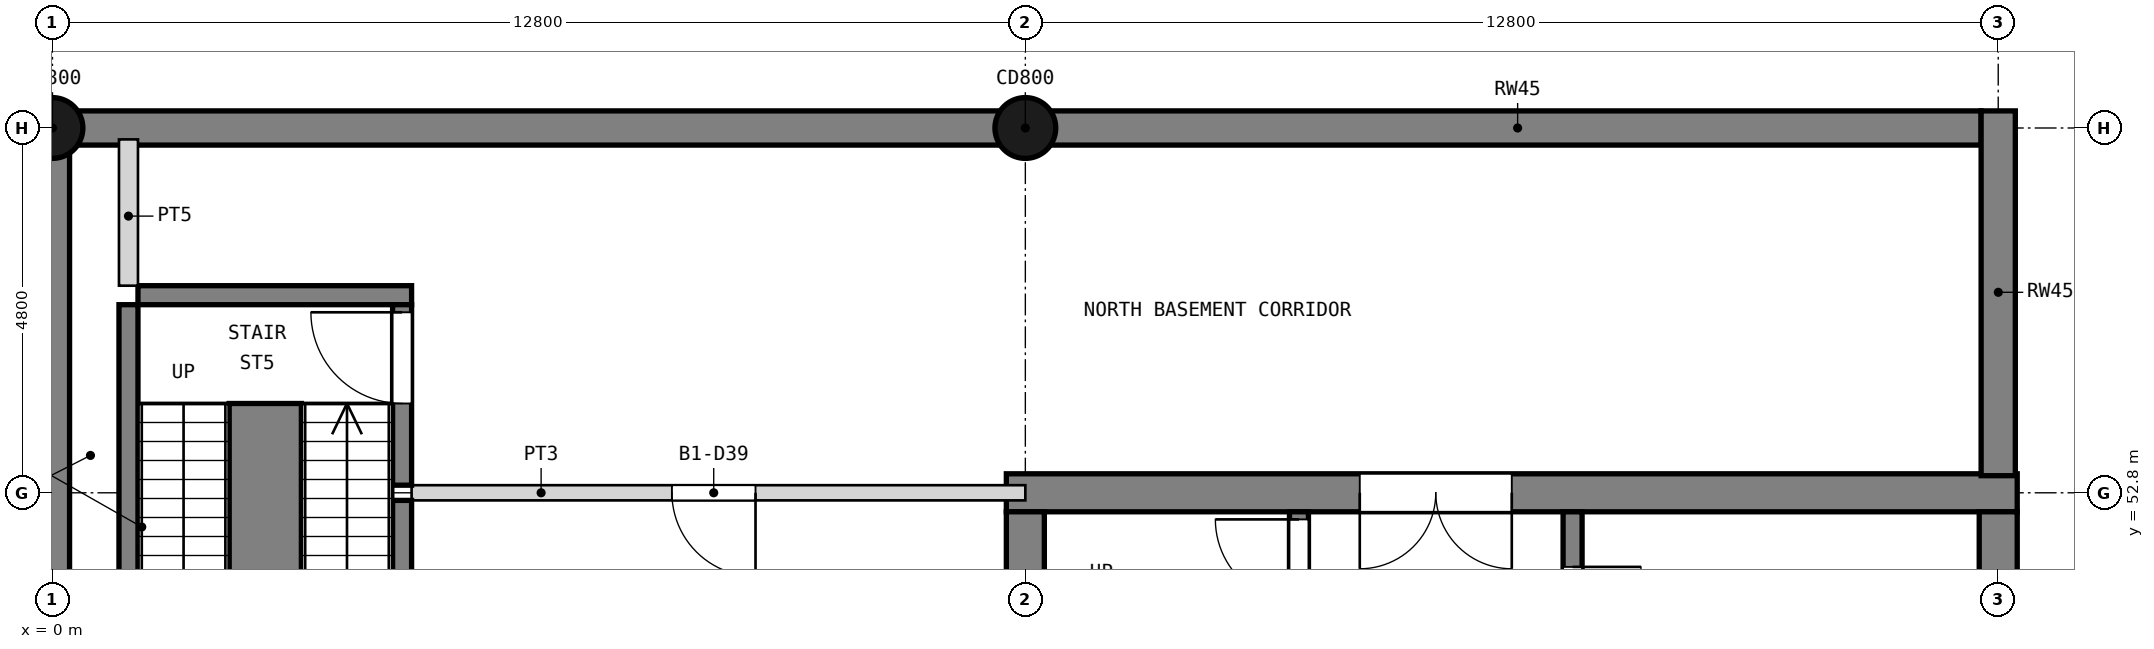
"""IFC4 building model, lengths in metres.
Left out: names, types, materials, properties, quantities, classifications, styles, units other than length and angle.
Written with IfcOpenShell. Run it as: python <this file> out.ifc"""

import sys

from ifc_helpers import new_model, si_unit, direction, frame, frame_2d, origin, origin_2d, place, context, subcontext, project, spatial, rectangle, circle, extrude, element, fill, save


model = new_model("IFC4")
c1 = context("Model", 3, precision=1e-05, world=origin(), true_north=direction((0.0, 1.0)))
c2 = subcontext(c1, "Body", "Model", "MODEL_VIEW")
j1 = project(units=[si_unit("LENGTHUNIT", "METRE"), si_unit("PLANEANGLEUNIT", "RADIAN")], contexts=[c1])
p1 = place(None, origin())
s1 = spatial("IfcSite", under=j1, at=p1, CompositionType="ELEMENT")
p2 = place(p1, origin())
s2 = spatial("IfcBuilding", under=s1, at=p2, CompositionType="ELEMENT")
p3 = place(p2, frame((0.0, 0.0, -4.8)))
s3 = spatial("IfcBuildingStorey", under=s2, at=p3, CompositionType="ELEMENT", Elevation=-4.8)
p4 = place(p3, frame((12.55, 52.8, 0.0), z_axis=(0.0, 0.0, 1.0), x_axis=(1.0, 0.0, 0.0)))
e1 = element("IfcWall", 1, at=p4, inside=s3, PredefinedType="SHEAR", context=c2, shape_type="SweptSolid", body=[
    extrude(rectangle(XDim=13.3, YDim=0.5, at=frame_2d((6.65, 0.0))), origin(), (0.0, 0.0, 1.0), 4.8),
])
p5 = place(p4, frame((4.65, 0.0, 0.0)))
e2 = element("IfcOpeningElement", 2, at=p5, cuts=e1, PredefinedType="OPENING", context=c2, shape_type="SweptSolid", body=[
    extrude(rectangle(XDim=2.0, YDim=2.1, at=frame_2d((1.0, 1.05))), frame((0.0, 0.26, 0.0), z_axis=(0.0, -1.0, 0.0), x_axis=(1.0, 0.0, 0.0)), (0.0, 0.0, 1.0), 0.52),
])
for number, where, z_axis, x_axis in (
    (3, (25.6, 33.85, 0.0), (0.0, 0.0, 1.0), (0.0, 1.0, 0.0)),
    (4, (12.8, 33.85, 0.0), (0.0, 0.0, 1.0), (0.0, 1.0, 0.0)),
):
    element("IfcWall", number, at=place(p3, frame(where, z_axis=z_axis, x_axis=x_axis)), inside=s3, PredefinedType="SHEAR", context=c2, shape_type="SweptSolid", body=[
        extrude(rectangle(XDim=18.7, YDim=0.5, at=frame_2d((9.35, 0.0))), origin(), (0.0, 0.0, 1.0), 4.8),
    ])
p6 = place(p3, frame((0.0, -0.225, 0.0), z_axis=(0.0, 0.0, 1.0), x_axis=(0.0, 1.0, 0.0)))
e5 = element("IfcWall", 5, at=p6, inside=s3, PredefinedType="SOLIDWALL", context=c2, shape_type="SweptSolid", body=[
    extrude(rectangle(XDim=58.05, YDim=0.45, at=frame_2d((29.025, 0.0))), origin(), (0.0, 0.0, 1.0), 4.8),
])
p7 = place(p3, frame((0.225, 57.6, 0.0), z_axis=(0.0, 0.0, 1.0), x_axis=(1.0, 0.0, 0.0)))
e6 = element("IfcWall", 6, at=p7, inside=s3, PredefinedType="SOLIDWALL", context=c2, shape_type="SweptSolid", body=[
    extrude(rectangle(XDim=25.15, YDim=0.45, at=frame_2d((12.575, 0.0))), origin(), (0.0, 0.0, 1.0), 4.8),
])
p8 = place(p3, frame((25.6, 53.025, 0.0), z_axis=(0.0, 0.0, 1.0), x_axis=(0.0, 1.0, 0.0)))
e7 = element("IfcWall", 7, at=p8, inside=s3, PredefinedType="SOLIDWALL", context=c2, shape_type="SweptSolid", body=[
    extrude(rectangle(XDim=4.8, YDim=0.45, at=frame_2d((2.4, 0.0))), origin(), (0.0, 0.0, 1.0), 4.8),
])
for number, where, z_axis, x_axis in (
    (8, (0.0, 57.6, 0.0), (0.0, 0.0, 1.0), (1.0, 0.0, 0.0)),
    (9, (12.8, 57.6, 0.0), (0.0, 0.0, 1.0), (1.0, 0.0, 0.0)),
):
    element("IfcColumn", number, at=place(p3, frame(where, z_axis=z_axis, x_axis=x_axis)), inside=s3, PredefinedType="COLUMN", context=c2, shape_type="SweptSolid", body=[
        extrude(circle(Radius=0.4, at=origin_2d()), origin(), (0.0, 0.0, 1.0), 4.8),
    ])
p9 = place(p3, frame((16.4, 46.475, 0.0), z_axis=(0.0, 0.0, 1.0), x_axis=(0.0, 1.0, 0.0)))
e10 = element("IfcWall", 10, at=p9, inside=s3, PredefinedType="SOLIDWALL", context=c2, shape_type="SweptSolid", body=[
    extrude(rectangle(XDim=6.075, YDim=0.25, at=frame_2d((3.038, 0.0))), origin(), (0.0, 0.0, 1.0), 4.5),
])
p10 = place(p9, frame((4.875, 0.0, 0.0)))
e11 = element("IfcOpeningElement", 11, at=p10, cuts=e10, PredefinedType="OPENING", context=c2, shape_type="SweptSolid", body=[
    extrude(rectangle(XDim=1.1, YDim=2.1, at=frame_2d((0.55, 1.05))), frame((0.0, 0.135, 0.0), z_axis=(0.0, -1.0, 0.0), x_axis=(1.0, 0.0, 0.0)), (0.0, 0.0, 1.0), 0.27),
])
p11 = place(p3, frame((20.0, 46.475, 0.0), z_axis=(0.0, 0.0, 1.0), x_axis=(0.0, 1.0, 0.0)))
e12 = element("IfcWall", 12, at=p11, inside=s3, PredefinedType="SOLIDWALL", context=c2, shape_type="SweptSolid", body=[
    extrude(rectangle(XDim=6.075, YDim=0.25, at=frame_2d((3.038, 0.0))), origin(), (0.0, 0.0, 1.0), 4.5),
])
p12 = place(p11, frame((1.312, 0.0, 0.0)))
e13 = element("IfcOpeningElement", 13, at=p12, cuts=e12, PredefinedType="OPENING", context=c2, shape_type="SweptSolid", body=[
    extrude(rectangle(XDim=1.0, YDim=2.1, at=frame_2d((0.5, 1.05))), frame((0.0, 0.135, 0.0), z_axis=(0.0, -1.0, 0.0), x_axis=(1.0, 0.0, 0.0)), (0.0, 0.0, 1.0), 0.27),
])
p13 = place(p11, frame((4.45, 0.0, 0.0)))
e14 = element("IfcOpeningElement", 14, at=p13, cuts=e12, PredefinedType="OPENING", context=c2, shape_type="SweptSolid", body=[
    extrude(rectangle(XDim=0.9, YDim=2.1, at=frame_2d((0.45, 1.05))), frame((0.0, 0.135, 0.0), z_axis=(0.0, -1.0, 0.0), x_axis=(1.0, 0.0, 0.0)), (0.0, 0.0, 1.0), 0.27),
])
p14 = place(p3, frame((4.725, 52.8, 0.0), z_axis=(0.0, 0.0, 1.0), x_axis=(1.0, 0.0, 0.0)))
e15 = element("IfcWall", 15, at=p14, inside=s3, PredefinedType="PARTITIONING", context=c2, shape_type="SweptSolid", body=[
    extrude(rectangle(XDim=8.075, YDim=0.2, at=frame_2d((4.038, 0.0))), origin(), (0.0, 0.0, 1.0), 4.5),
])
p15 = place(p14, frame((3.425, 0.0, 0.0)))
e16 = element("IfcOpeningElement", 16, at=p15, cuts=e15, PredefinedType="OPENING", context=c2, shape_type="SweptSolid", body=[
    extrude(rectangle(XDim=1.1, YDim=2.1, at=frame_2d((0.55, 1.05))), frame((0.0, 0.11, 0.0), z_axis=(0.0, -1.0, 0.0), x_axis=(1.0, 0.0, 0.0)), (0.0, 0.0, 1.0), 0.22),
])
p16 = place(p3, frame((1.125, 55.4, 0.0), z_axis=(0.0, 0.0, 1.0), x_axis=(1.0, 0.0, 0.0)))
e17 = element("IfcWall", 17, at=p16, inside=s3, PredefinedType="SHEAR", context=c2, shape_type="SweptSolid", body=[
    extrude(rectangle(XDim=3.6, YDim=0.25, at=frame_2d((1.8, 0.0))), origin(), (0.0, 0.0, 1.0), 4.5),
])
p17 = place(p3, frame((1.0, 49.525, 0.0), z_axis=(0.0, 0.0, 1.0), x_axis=(0.0, 1.0, 0.0)))
e18 = element("IfcWall", 18, at=p17, inside=s3, PredefinedType="SHEAR", context=c2, shape_type="SweptSolid", body=[
    extrude(rectangle(XDim=5.75, YDim=0.25, at=frame_2d((2.875, 0.0))), origin(), (0.0, 0.0, 1.0), 4.5),
])
p18 = place(p3, frame((1.0, 55.525, 0.0), z_axis=(0.0, 0.0, 1.0), x_axis=(0.0, 1.0, 0.0)))
e19 = element("IfcWall", 19, at=p18, inside=s3, PredefinedType="PARTITIONING", context=c2, shape_type="SweptSolid", body=[
    extrude(rectangle(XDim=1.925, YDim=0.25, at=frame_2d((0.962, 0.0))), origin(), (0.0, 0.0, 1.0), 4.5),
])
p19 = place(p3, frame((4.6, 49.525, 0.0), z_axis=(0.0, 0.0, 1.0), x_axis=(0.0, 1.0, 0.0)))
e20 = element("IfcWall", 20, at=p19, inside=s3, PredefinedType="SHEAR", context=c2, shape_type="SweptSolid", body=[
    extrude(rectangle(XDim=3.175, YDim=0.25, at=frame_2d((1.587, 0.0))), origin(), (0.0, 0.0, 1.0), 4.5),
])
p20 = place(p3, frame((4.6, 52.9, 0.0), z_axis=(0.0, 0.0, 1.0), x_axis=(0.0, 1.0, 0.0)))
e21 = element("IfcWall", 21, at=p20, inside=s3, PredefinedType="SHEAR", context=c2, shape_type="SweptSolid", body=[
    extrude(rectangle(XDim=2.375, YDim=0.25, at=frame_2d((1.188, 0.0))), origin(), (0.0, 0.0, 1.0), 4.5),
])
p21 = place(p20, frame((1.075, 0.0, 0.0)))
e22 = element("IfcOpeningElement", 22, at=p21, cuts=e21, PredefinedType="OPENING", context=c2, shape_type="SweptSolid", body=[
    extrude(rectangle(XDim=1.2, YDim=2.1, at=frame_2d((0.6, 1.05))), frame((0.0, 0.135, 0.0), z_axis=(0.0, -1.0, 0.0), x_axis=(1.0, 0.0, 0.0)), (0.0, 0.0, 1.0), 0.27),
])
p22 = place(p3, frame((2.8, 53.975, 0.0), z_axis=(0.0, 0.0, 1.0), x_axis=(0.0, -1.0, 0.0)))
e23 = element("IfcWall", 23, at=p22, inside=s3, PredefinedType="SHEAR", context=c2, shape_type="SweptSolid", body=[
    extrude(rectangle(XDim=3.25, YDim=0.95, at=frame_2d((1.625, 0.0))), origin(), (0.0, 0.0, 1.0), 4.8),
])
p23 = place(p10, origin())
e24 = element("IfcDoor", 24, at=p23, inside=s3, OperationType="SINGLE_SWING_RIGHT", PredefinedType="DOOR", context=c2, shape_type="SweptSolid", body=[
    extrude(rectangle(XDim=1.1, YDim=2.1, at=frame_2d((0.55, 1.05))), frame((0.0, 0.025, 0.0), z_axis=(0.0, -1.0, 0.0), x_axis=(1.0, 0.0, 0.0)), (0.0, 0.0, 1.0), 0.05),
])
fill(e11, e24)
p24 = place(p13, frame((0.9, 0.0, 0.0), z_axis=(0.0, 0.0, 1.0), x_axis=(-1.0, 0.0, 0.0)))
e25 = element("IfcDoor", 25, at=p24, inside=s3, OperationType="SINGLE_SWING_LEFT", PredefinedType="DOOR", context=c2, shape_type="SweptSolid", body=[
    extrude(rectangle(XDim=0.9, YDim=2.1, at=frame_2d((0.45, 1.05))), frame((0.0, 0.025, 0.0), z_axis=(0.0, -1.0, 0.0), x_axis=(1.0, 0.0, 0.0)), (0.0, 0.0, 1.0), 0.05),
])
fill(e14, e25)
p25 = place(p5, frame((2.0, 0.0, 0.0), z_axis=(0.0, 0.0, 1.0), x_axis=(-1.0, 0.0, 0.0)))
e26 = element("IfcDoor", 26, at=p25, inside=s3, OperationType="DOUBLE_DOOR_SINGLE_SWING", PredefinedType="DOOR", context=c2, shape_type="SweptSolid", body=[
    extrude(rectangle(XDim=2.0, YDim=2.1, at=frame_2d((1.0, 1.05))), frame((0.0, 0.025, 0.0), z_axis=(0.0, -1.0, 0.0), x_axis=(1.0, 0.0, 0.0)), (0.0, 0.0, 1.0), 0.05),
])
fill(e2, e26)
p26 = place(p15, frame((1.1, 0.0, 0.0), z_axis=(0.0, 0.0, 1.0), x_axis=(-1.0, 0.0, 0.0)))
e27 = element("IfcDoor", 27, at=p26, inside=s3, OperationType="SINGLE_SWING_LEFT", PredefinedType="DOOR", context=c2, shape_type="SweptSolid", body=[
    extrude(rectangle(XDim=1.1, YDim=2.1, at=frame_2d((0.55, 1.05))), frame((0.0, 0.025, 0.0), z_axis=(0.0, -1.0, 0.0), x_axis=(1.0, 0.0, 0.0)), (0.0, 0.0, 1.0), 0.05),
])
fill(e16, e27)
p27 = place(p21, origin())
e28 = element("IfcDoor", 28, at=p27, inside=s3, OperationType="SINGLE_SWING_RIGHT", PredefinedType="DOOR", context=c2, shape_type="SweptSolid", body=[
    extrude(rectangle(XDim=1.2, YDim=2.1, at=frame_2d((0.6, 1.05))), frame((0.0, 0.025, 0.0), z_axis=(0.0, -1.0, 0.0), x_axis=(1.0, 0.0, 0.0)), (0.0, 0.0, 1.0), 0.05),
])
fill(e22, e28)
save(model, sys.argv[1])
